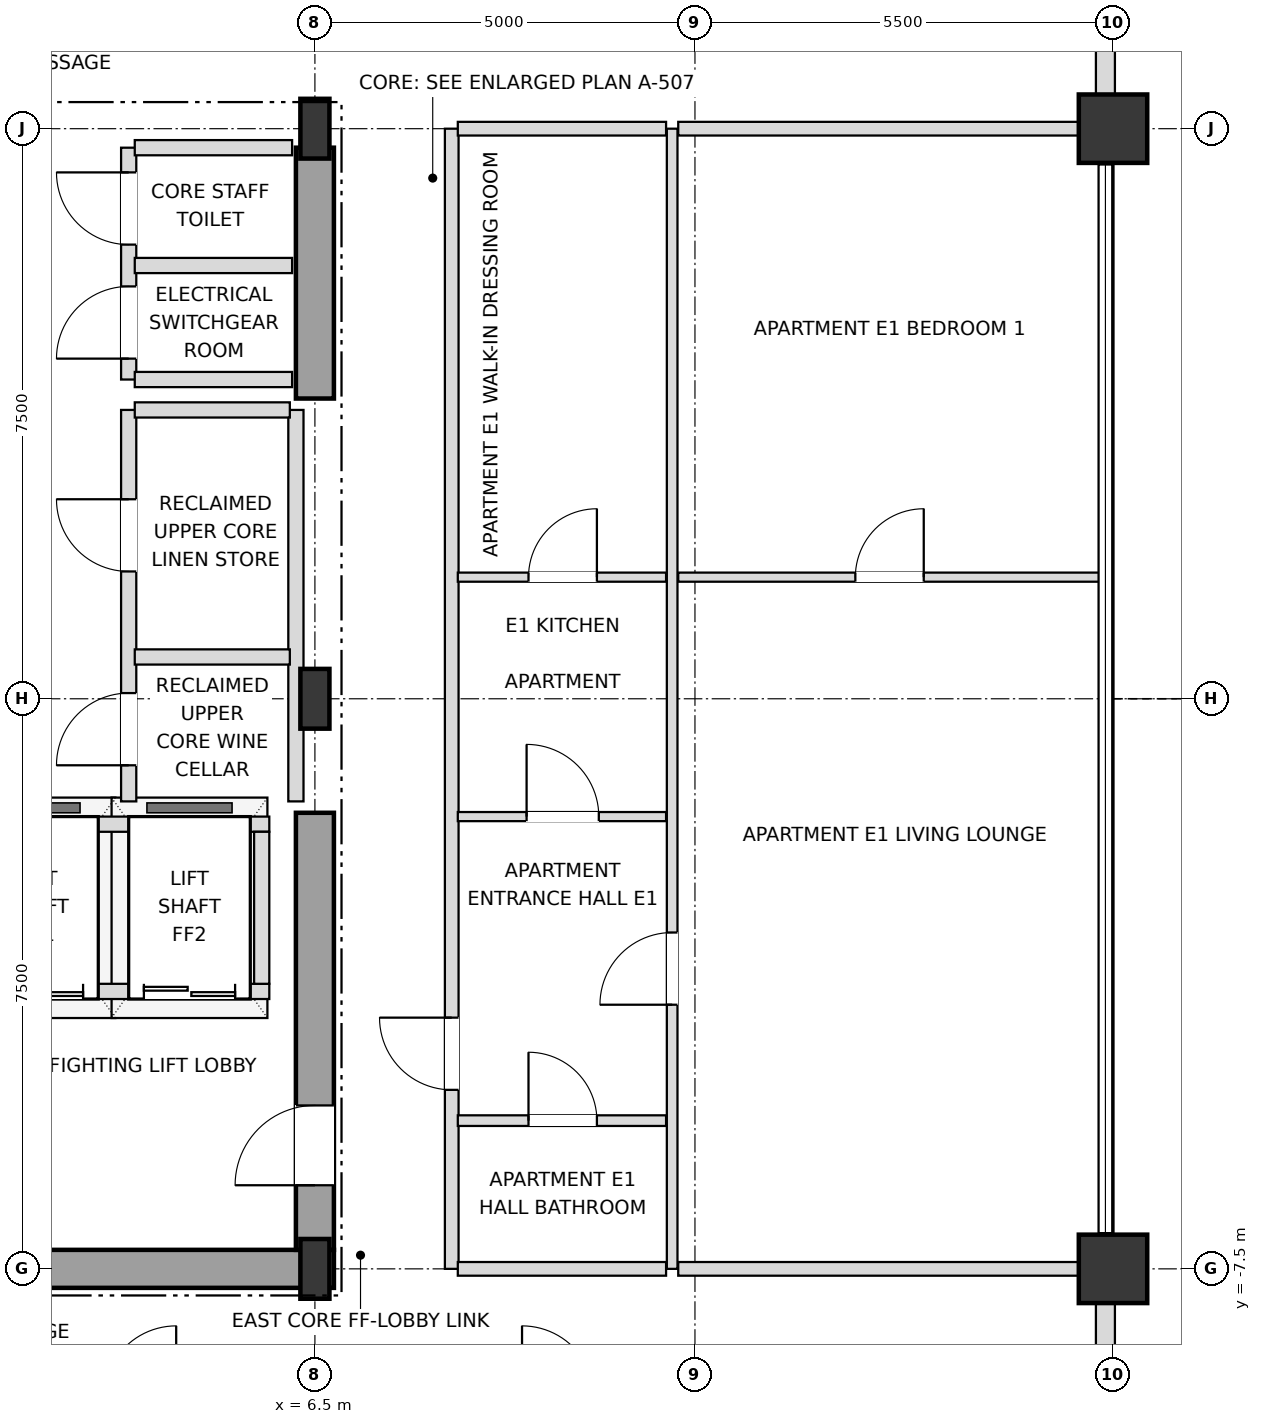
"""IFC4 building model, lengths in metres.
Left out: names, types, materials, properties, quantities, classifications, styles, units other than length and angle.
Written with IfcOpenShell. Run it as: python <this file> out.ifc"""

import sys

from ifc_helpers import new_model, si_unit, direction, frame, frame_2d, origin, origin_2d, place, context, subcontext, project, spatial, rectangle, i_section, extrude, element, fill, save


model = new_model("IFC4")
c1 = context("Model", 3, precision=1e-05, world=origin(), true_north=direction((0.0, 1.0)))
c2 = subcontext(c1, "Body", "Model", "MODEL_VIEW")
j1 = project(units=[si_unit("LENGTHUNIT", "METRE"), si_unit("PLANEANGLEUNIT", "RADIAN")], contexts=[c1])
p1 = place(None, origin())
s1 = spatial("IfcSite", under=j1, at=p1, CompositionType="ELEMENT")
p2 = place(p1, origin())
s2 = spatial("IfcBuilding", under=s1, at=p2, CompositionType="ELEMENT")
p3 = place(p2, frame((0.0, 0.0, 283.5)))
s3 = spatial("IfcBuildingStorey", under=s2, at=p3, CompositionType="ELEMENT", Elevation=283.5)
for number, where, z_axis, x_axis in (
    (1, (6.5, -7.5, 0.0), (0.0, 0.0, 1.0), (1.0, 0.0, 0.0)),
    (2, (6.5, 0.0, 0.0), (0.0, 0.0, 1.0), (1.0, 0.0, 0.0)),
    (3, (6.5, 7.5, 0.0), (0.0, 0.0, 1.0), (1.0, 0.0, 0.0)),
):
    element("IfcColumn", number, at=place(p3, frame(where, z_axis=z_axis, x_axis=x_axis)), inside=s3, PredefinedType="COLUMN", context=c2, shape_type="SweptSolid", body=[
        extrude(i_section(OverallWidth=0.382, OverallDepth=0.786, WebThickness=0.02, FlangeThickness=0.033, at=origin_2d()), origin(), (0.0, 0.0, 1.0), 3.6),
    ])
for number, where, z_axis, x_axis in (
    (4, (17.0, -7.5, 0.0), (0.0, 0.0, 1.0), (1.0, 0.0, 0.0)),
    (5, (17.0, 7.5, 0.0), (0.0, 0.0, 1.0), (1.0, 0.0, 0.0)),
):
    element("IfcColumn", number, at=place(p3, frame(where, z_axis=z_axis, x_axis=x_axis)), inside=s3, PredefinedType="USERDEFINED", context=c2, shape_type="SweptSolid", body=[
        extrude(rectangle(XDim=0.9, YDim=0.9, at=origin_2d()), origin(), (0.0, 0.0, 1.0), 3.6),
    ])
p4 = place(p3, frame((16.9, -12.555, 0.0), z_axis=(0.0, 0.0, 1.0), x_axis=(0.0, 1.0, 0.0)))
e6 = element("IfcWall", 6, at=p4, inside=s3, PredefinedType="SOLIDWALL", context=c2, shape_type="SweptSolid", body=[
    extrude(rectangle(XDim=4.61, YDim=0.25, at=frame_2d((2.305, 0.0))), origin(), (0.0, 0.0, 1.0), 2.748),
])
p5 = place(p4, frame((1.405, 0.0, 0.72)))
e7 = element("IfcOpeningElement", 7, at=p5, cuts=e6, PredefinedType="OPENING", context=c2, shape_type="SweptSolid", body=[
    extrude(rectangle(XDim=1.8, YDim=1.68, at=frame_2d((0.9, 0.84))), frame((0.0, 0.135, 0.0), z_axis=(0.0, -1.0, 0.0), x_axis=(1.0, 0.0, 0.0)), (0.0, 0.0, 1.0), 0.27),
])
p6 = place(p3, frame((16.9, 7.945, 0.0), z_axis=(0.0, 0.0, 1.0), x_axis=(0.0, 1.0, 0.0)))
e8 = element("IfcWall", 8, at=p6, inside=s3, PredefinedType="SOLIDWALL", context=c2, shape_type="SweptSolid", body=[
    extrude(rectangle(XDim=4.61, YDim=0.25, at=frame_2d((2.305, 0.0))), origin(), (0.0, 0.0, 1.0), 2.748),
])
p7 = place(p6, frame((1.405, 0.0, 0.72)))
e9 = element("IfcOpeningElement", 9, at=p7, cuts=e8, PredefinedType="OPENING", context=c2, shape_type="SweptSolid", body=[
    extrude(rectangle(XDim=1.8, YDim=1.68, at=frame_2d((0.9, 0.84))), frame((0.0, 0.135, 0.0), z_axis=(0.0, -1.0, 0.0), x_axis=(1.0, 0.0, 0.0)), (0.0, 0.0, 1.0), 0.27),
])
p8 = place(p3, frame((0.0, -7.5, 0.0), z_axis=(0.0, 0.0, 1.0), x_axis=(1.0, 0.0, 0.0)))
e10 = element("IfcWall", 10, at=p8, inside=s3, PredefinedType="SHEAR", context=c2, shape_type="SweptSolid", body=[
    extrude(rectangle(XDim=6.75, YDim=0.5, at=frame_2d((3.375, 0.0))), origin(), (0.0, 0.0, 1.0), 3.38),
])
p9 = place(p3, frame((6.5, -7.25, 0.0), z_axis=(0.0, 0.0, 1.0), x_axis=(0.0, 1.0, 0.0)))
e11 = element("IfcWall", 11, at=p9, inside=s3, PredefinedType="SHEAR", context=c2, shape_type="SweptSolid", body=[
    extrude(rectangle(XDim=5.75, YDim=0.5, at=frame_2d((2.875, 0.0))), origin(), (0.0, 0.0, 1.0), 3.38),
])
p10 = place(p9, frame((0.85, 0.0, 0.0)))
e12 = element("IfcOpeningElement", 12, at=p10, cuts=e11, PredefinedType="OPENING", context=c2, shape_type="SweptSolid", body=[
    extrude(rectangle(XDim=1.05, YDim=2.15, at=frame_2d((0.525, 1.075))), frame((0.0, 0.26, 0.0), z_axis=(0.0, -1.0, 0.0), x_axis=(1.0, 0.0, 0.0)), (0.0, 0.0, 1.0), 0.52),
])
p11 = place(p3, frame((6.5, 3.95, 0.0), z_axis=(0.0, 0.0, 1.0), x_axis=(0.0, 1.0, 0.0)))
e13 = element("IfcWall", 13, at=p11, inside=s3, PredefinedType="SHEAR", context=c2, shape_type="SweptSolid", body=[
    extrude(rectangle(XDim=3.3, YDim=0.5, at=frame_2d((1.65, 0.0))), origin(), (0.0, 0.0, 1.0), 3.38),
])
p12 = place(p3, frame((1.8, -3.85, 0.0), z_axis=(0.0, 0.0, 1.0), x_axis=(1.0, 0.0, 0.0)))
e14 = element("IfcWall", 14, at=p12, inside=s3, PredefinedType="SOLIDWALL", context=c2, shape_type="SweptSolid", body=[
    extrude(rectangle(XDim=4.1, YDim=0.2, at=frame_2d((2.05, 0.0))), origin(), (0.0, 0.0, 1.0), 3.38),
])
p13 = place(p12, frame((0.45, 0.0, 0.0)))
e15 = element("IfcOpeningElement", 15, at=p13, cuts=e14, PredefinedType="OPENING", context=c2, shape_type="SweptSolid", body=[
    extrude(rectangle(XDim=1.2, YDim=2.2, at=frame_2d((0.6, 1.1))), frame((0.0, 0.11, 0.0), z_axis=(0.0, -1.0, 0.0), x_axis=(1.0, 0.0, 0.0)), (0.0, 0.0, 1.0), 0.22),
])
p14 = place(p12, frame((2.45, 0.0, 0.0)))
e16 = element("IfcOpeningElement", 16, at=p14, cuts=e14, PredefinedType="OPENING", context=c2, shape_type="SweptSolid", body=[
    extrude(rectangle(XDim=1.2, YDim=2.2, at=frame_2d((0.6, 1.1))), frame((0.0, 0.11, 0.0), z_axis=(0.0, -1.0, 0.0), x_axis=(1.0, 0.0, 0.0)), (0.0, 0.0, 1.0), 0.22),
])
p15 = place(p3, frame((1.8, -1.65, 0.0), z_axis=(0.0, 0.0, 1.0), x_axis=(1.0, 0.0, 0.0)))
e17 = element("IfcWall", 17, at=p15, inside=s3, PredefinedType="SOLIDWALL", context=c2, shape_type="SweptSolid", body=[
    extrude(rectangle(XDim=4.1, YDim=0.2, at=frame_2d((2.05, 0.0))), origin(), (0.0, 0.0, 1.0), 3.38),
])
p16 = place(p3, frame((5.8, -3.75, 0.0), z_axis=(0.0, 0.0, 1.0), x_axis=(0.0, 1.0, 0.0)))
e18 = element("IfcWall", 18, at=p16, inside=s3, PredefinedType="SOLIDWALL", context=c2, shape_type="SweptSolid", body=[
    extrude(rectangle(XDim=2.0, YDim=0.2, at=frame_2d((1.0, 0.0))), origin(), (0.0, 0.0, 1.0), 3.38),
])
p17 = place(p3, frame((4.05, -1.35, 0.0), z_axis=(0.0, 0.0, 1.0), x_axis=(0.0, 1.0, 0.0)))
e19 = element("IfcWall", 19, at=p17, inside=s3, PredefinedType="SOLIDWALL", context=c2, shape_type="SweptSolid", body=[
    extrude(rectangle(XDim=5.15, YDim=0.2, at=frame_2d((2.575, 0.0))), origin(), (0.0, 0.0, 1.0), 3.38),
])
p18 = place(p17, frame((0.475, 0.0, 0.0)))
e20 = element("IfcOpeningElement", 20, at=p18, cuts=e19, PredefinedType="OPENING", context=c2, shape_type="SweptSolid", body=[
    extrude(rectangle(XDim=0.95, YDim=2.15, at=frame_2d((0.475, 1.075))), frame((0.0, 0.11, 0.0), z_axis=(0.0, -1.0, 0.0), x_axis=(1.0, 0.0, 0.0)), (0.0, 0.0, 1.0), 0.22),
])
p19 = place(p17, frame((3.025, 0.0, 0.0)))
e21 = element("IfcOpeningElement", 21, at=p19, cuts=e19, PredefinedType="OPENING", context=c2, shape_type="SweptSolid", body=[
    extrude(rectangle(XDim=0.95, YDim=2.15, at=frame_2d((0.475, 1.075))), frame((0.0, 0.11, 0.0), z_axis=(0.0, -1.0, 0.0), x_axis=(1.0, 0.0, 0.0)), (0.0, 0.0, 1.0), 0.22),
])
p20 = place(p3, frame((4.05, 4.2, 0.0), z_axis=(0.0, 0.0, 1.0), x_axis=(0.0, 1.0, 0.0)))
e22 = element("IfcWall", 22, at=p20, inside=s3, PredefinedType="SOLIDWALL", context=c2, shape_type="SweptSolid", body=[
    extrude(rectangle(XDim=3.05, YDim=0.2, at=frame_2d((1.525, 0.0))), origin(), (0.0, 0.0, 1.0), 3.38),
])
p21 = place(p20, frame((0.275, 0.0, 0.0)))
e23 = element("IfcOpeningElement", 23, at=p21, cuts=e22, PredefinedType="OPENING", context=c2, shape_type="SweptSolid", body=[
    extrude(rectangle(XDim=0.95, YDim=2.15, at=frame_2d((0.475, 1.075))), frame((0.0, 0.11, 0.0), z_axis=(0.0, -1.0, 0.0), x_axis=(1.0, 0.0, 0.0)), (0.0, 0.0, 1.0), 0.22),
])
p22 = place(p20, frame((1.775, 0.0, 0.0)))
e24 = element("IfcOpeningElement", 24, at=p22, cuts=e22, PredefinedType="OPENING", context=c2, shape_type="SweptSolid", body=[
    extrude(rectangle(XDim=0.95, YDim=2.15, at=frame_2d((0.475, 1.075))), frame((0.0, 0.11, 0.0), z_axis=(0.0, -1.0, 0.0), x_axis=(1.0, 0.0, 0.0)), (0.0, 0.0, 1.0), 0.22),
])
p23 = place(p3, frame((6.25, -1.35, 0.0), z_axis=(0.0, 0.0, 1.0), x_axis=(0.0, 1.0, 0.0)))
e25 = element("IfcWall", 25, at=p23, inside=s3, PredefinedType="SOLIDWALL", context=c2, shape_type="SweptSolid", body=[
    extrude(rectangle(XDim=5.15, YDim=0.2, at=frame_2d((2.575, 0.0))), origin(), (0.0, 0.0, 1.0), 3.38),
])
p24 = place(p3, frame((8.3, -7.5, 0.0), z_axis=(0.0, 0.0, 1.0), x_axis=(0.0, 1.0, 0.0)))
e26 = element("IfcWall", 26, at=p24, inside=s3, PredefinedType="PARTITIONING", context=c2, shape_type="SweptSolid", body=[
    extrude(rectangle(XDim=15.0, YDim=0.18, at=frame_2d((7.5, 0.0))), origin(), (0.0, 0.0, 1.0), 3.38),
])
p25 = place(p24, frame((2.355, 0.0, 0.0)))
e27 = element("IfcOpeningElement", 27, at=p25, cuts=e26, PredefinedType="OPENING", context=c2, shape_type="SweptSolid", body=[
    extrude(rectangle(XDim=0.95, YDim=2.15, at=frame_2d((0.475, 1.075))), frame((0.0, 0.1, 0.0), z_axis=(0.0, -1.0, 0.0), x_axis=(1.0, 0.0, 0.0)), (0.0, 0.0, 1.0), 0.2),
])
p26 = place(p3, frame((11.2, -7.5, 0.0), z_axis=(0.0, 0.0, 1.0), x_axis=(0.0, 1.0, 0.0)))
e28 = element("IfcWall", 28, at=p26, inside=s3, PredefinedType="PARTITIONING", context=c2, shape_type="SweptSolid", body=[
    extrude(rectangle(XDim=15.0, YDim=0.14, at=frame_2d((7.5, 0.0))), origin(), (0.0, 0.0, 1.0), 3.38),
])
p27 = place(p26, frame((3.475, 0.0, 0.0)))
e29 = element("IfcOpeningElement", 29, at=p27, cuts=e28, PredefinedType="OPENING", context=c2, shape_type="SweptSolid", body=[
    extrude(rectangle(XDim=0.95, YDim=2.1, at=frame_2d((0.475, 1.05))), frame((0.0, 0.08, 0.0), z_axis=(0.0, -1.0, 0.0), x_axis=(1.0, 0.0, 0.0)), (0.0, 0.0, 1.0), 0.16),
])
p28 = place(p3, frame((8.38, -7.5, 0.0), z_axis=(0.0, 0.0, 1.0), x_axis=(1.0, 0.0, 0.0)))
e30 = element("IfcWall", 30, at=p28, inside=s3, PredefinedType="PARTITIONING", context=c2, shape_type="SweptSolid", body=[
    extrude(rectangle(XDim=2.74, YDim=0.18, at=frame_2d((1.37, 0.0))), origin(), (0.0, 0.0, 1.0), 2.826),
])
p29 = place(p3, frame((11.28, -7.5, 0.0), z_axis=(0.0, 0.0, 1.0), x_axis=(1.0, 0.0, 0.0)))
e31 = element("IfcWall", 31, at=p29, inside=s3, PredefinedType="PARTITIONING", context=c2, shape_type="SweptSolid", body=[
    extrude(rectangle(XDim=5.62, YDim=0.18, at=frame_2d((2.81, 0.0))), origin(), (0.0, 0.0, 1.0), 2.826),
])
p30 = place(p3, frame((8.38, -5.55, 0.0), z_axis=(0.0, 0.0, 1.0), x_axis=(1.0, 0.0, 0.0)))
e32 = element("IfcWall", 32, at=p30, inside=s3, PredefinedType="PARTITIONING", context=c2, shape_type="SweptSolid", body=[
    extrude(rectangle(XDim=2.74, YDim=0.14, at=frame_2d((1.37, 0.0))), origin(), (0.0, 0.0, 1.0), 3.38),
])
p31 = place(p30, frame((0.93, 0.0, 0.0)))
e33 = element("IfcOpeningElement", 33, at=p31, cuts=e32, PredefinedType="OPENING", context=c2, shape_type="SweptSolid", body=[
    extrude(rectangle(XDim=0.9, YDim=2.1, at=frame_2d((0.45, 1.05))), frame((0.0, 0.08, 0.0), z_axis=(0.0, -1.0, 0.0), x_axis=(1.0, 0.0, 0.0)), (0.0, 0.0, 1.0), 0.16),
])
p32 = place(p3, frame((8.38, -1.55, 0.0), z_axis=(0.0, 0.0, 1.0), x_axis=(1.0, 0.0, 0.0)))
e34 = element("IfcWall", 34, at=p32, inside=s3, PredefinedType="PARTITIONING", context=c2, shape_type="SweptSolid", body=[
    extrude(rectangle(XDim=2.74, YDim=0.12, at=frame_2d((1.37, 0.0))), origin(), (0.0, 0.0, 1.0), 3.38),
])
p33 = place(p32, frame((0.905, 0.0, 0.0)))
e35 = element("IfcOpeningElement", 35, at=p33, cuts=e34, PredefinedType="OPENING", context=c2, shape_type="SweptSolid", body=[
    extrude(rectangle(XDim=0.95, YDim=2.1, at=frame_2d((0.475, 1.05))), frame((0.0, 0.07, 0.0), z_axis=(0.0, -1.0, 0.0), x_axis=(1.0, 0.0, 0.0)), (0.0, 0.0, 1.0), 0.14),
])
p34 = place(p3, frame((4.13, 0.55, 0.0), z_axis=(0.0, 0.0, 1.0), x_axis=(1.0, 0.0, 0.0)))
e36 = element("IfcWall", 36, at=p34, inside=s3, PredefinedType="SOLIDWALL", context=c2, shape_type="SweptSolid", body=[
    extrude(rectangle(XDim=2.04, YDim=0.2, at=frame_2d((1.02, 0.0))), origin(), (0.0, 0.0, 1.0), 3.38),
])
p35 = place(p3, frame((8.38, 1.6, 0.0), z_axis=(0.0, 0.0, 1.0), x_axis=(1.0, 0.0, 0.0)))
e37 = element("IfcWall", 37, at=p35, inside=s3, PredefinedType="PARTITIONING", context=c2, shape_type="SweptSolid", body=[
    extrude(rectangle(XDim=2.74, YDim=0.12, at=frame_2d((1.37, 0.0))), origin(), (0.0, 0.0, 1.0), 3.38),
])
p36 = place(p35, frame((0.93, 0.0, 0.0)))
e38 = element("IfcOpeningElement", 38, at=p36, cuts=e37, PredefinedType="OPENING", context=c2, shape_type="SweptSolid", body=[
    extrude(rectangle(XDim=0.9, YDim=2.1, at=frame_2d((0.45, 1.05))), frame((0.0, 0.07, 0.0), z_axis=(0.0, -1.0, 0.0), x_axis=(1.0, 0.0, 0.0)), (0.0, 0.0, 1.0), 0.14),
])
p37 = place(p3, frame((11.28, 1.6, 0.0), z_axis=(0.0, 0.0, 1.0), x_axis=(1.0, 0.0, 0.0)))
e39 = element("IfcWall", 39, at=p37, inside=s3, PredefinedType="PARTITIONING", context=c2, shape_type="SweptSolid", body=[
    extrude(rectangle(XDim=5.54, YDim=0.12, at=frame_2d((2.77, 0.0))), origin(), (0.0, 0.0, 1.0), 3.018),
])
p38 = place(p37, frame((2.33, 0.0, 0.0)))
e40 = element("IfcOpeningElement", 40, at=p38, cuts=e39, PredefinedType="OPENING", context=c2, shape_type="SweptSolid", body=[
    extrude(rectangle(XDim=0.9, YDim=2.1, at=frame_2d((0.45, 1.05))), frame((0.0, 0.07, 0.0), z_axis=(0.0, -1.0, 0.0), x_axis=(1.0, 0.0, 0.0)), (0.0, 0.0, 1.0), 0.14),
])
p39 = place(p3, frame((4.13, 3.8, 0.0), z_axis=(0.0, 0.0, 1.0), x_axis=(1.0, 0.0, 0.0)))
e41 = element("IfcWall", 41, at=p39, inside=s3, PredefinedType="SOLIDWALL", context=c2, shape_type="SweptSolid", body=[
    extrude(rectangle(XDim=2.04, YDim=0.2, at=frame_2d((1.02, 0.0))), origin(), (0.0, 0.0, 1.0), 3.38),
])
for number, where, z_axis, x_axis in (
    (42, (4.13, 4.2, 0.0), (0.0, 0.0, 1.0), (1.0, 0.0, 0.0)),
    (43, (4.13, 5.7, 0.0), (0.0, 0.0, 1.0), (1.0, 0.0, 0.0)),
    (44, (4.13, 7.25, 0.0), (0.0, 0.0, 1.0), (1.0, 0.0, 0.0)),
):
    element("IfcWall", number, at=place(p3, frame(where, z_axis=z_axis, x_axis=x_axis)), inside=s3, PredefinedType="SOLIDWALL", context=c2, shape_type="SweptSolid", body=[
        extrude(rectangle(XDim=2.07, YDim=0.2, at=frame_2d((1.035, 0.0))), origin(), (0.0, 0.0, 1.0), 3.38),
    ])
p40 = place(p3, frame((8.38, 7.5, 0.0), z_axis=(0.0, 0.0, 1.0), x_axis=(1.0, 0.0, 0.0)))
e45 = element("IfcWall", 45, at=p40, inside=s3, PredefinedType="PARTITIONING", context=c2, shape_type="SweptSolid", body=[
    extrude(rectangle(XDim=2.74, YDim=0.18, at=frame_2d((1.37, 0.0))), origin(), (0.0, 0.0, 1.0), 2.826),
])
p41 = place(p3, frame((11.28, 7.5, 0.0), z_axis=(0.0, 0.0, 1.0), x_axis=(1.0, 0.0, 0.0)))
e46 = element("IfcWall", 46, at=p41, inside=s3, PredefinedType="PARTITIONING", context=c2, shape_type="SweptSolid", body=[
    extrude(rectangle(XDim=5.62, YDim=0.18, at=frame_2d((2.81, 0.0))), origin(), (0.0, 0.0, 1.0), 2.826),
])
p42 = place(p10, origin())
e47 = element("IfcDoor", 47, at=p42, inside=s3, OperationType="SINGLE_SWING_LEFT", PredefinedType="DOOR", context=c2, shape_type="SweptSolid", body=[
    extrude(rectangle(XDim=1.05, YDim=2.15, at=frame_2d((0.525, 1.075))), frame((0.0, 0.025, 0.0), z_axis=(0.0, -1.0, 0.0), x_axis=(1.0, 0.0, 0.0)), (0.0, 0.0, 1.0), 0.05),
])
fill(e12, e47)
p43 = place(p13, origin())
e48 = element("IfcDoor", 48, at=p43, inside=s3, OperationType="DOUBLE_DOOR_SLIDING", PredefinedType="DOOR", context=c2, shape_type="SweptSolid", body=[
    extrude(rectangle(XDim=1.2, YDim=2.2, at=frame_2d((0.6, 1.1))), frame((0.0, 0.025, 0.0), z_axis=(0.0, -1.0, 0.0), x_axis=(1.0, 0.0, 0.0)), (0.0, 0.0, 1.0), 0.05),
])
fill(e15, e48)
p44 = place(p14, origin())
e49 = element("IfcDoor", 49, at=p44, inside=s3, OperationType="DOUBLE_DOOR_SLIDING", PredefinedType="DOOR", context=c2, shape_type="SweptSolid", body=[
    extrude(rectangle(XDim=1.2, YDim=2.2, at=frame_2d((0.6, 1.1))), frame((0.0, 0.025, 0.0), z_axis=(0.0, -1.0, 0.0), x_axis=(1.0, 0.0, 0.0)), (0.0, 0.0, 1.0), 0.05),
])
fill(e16, e49)
p45 = place(p18, origin())
e50 = element("IfcDoor", 50, at=p45, inside=s3, OperationType="SINGLE_SWING_LEFT", PredefinedType="DOOR", context=c2, shape_type="SweptSolid", body=[
    extrude(rectangle(XDim=0.95, YDim=2.15, at=frame_2d((0.475, 1.075))), frame((0.0, 0.025, 0.0), z_axis=(0.0, -1.0, 0.0), x_axis=(1.0, 0.0, 0.0)), (0.0, 0.0, 1.0), 0.05),
])
fill(e20, e50)
p46 = place(p19, origin())
e51 = element("IfcDoor", 51, at=p46, inside=s3, OperationType="SINGLE_SWING_RIGHT", PredefinedType="DOOR", context=c2, shape_type="SweptSolid", body=[
    extrude(rectangle(XDim=0.95, YDim=2.15, at=frame_2d((0.475, 1.075))), frame((0.0, 0.025, 0.0), z_axis=(0.0, -1.0, 0.0), x_axis=(1.0, 0.0, 0.0)), (0.0, 0.0, 1.0), 0.05),
])
fill(e21, e51)
p47 = place(p21, origin())
e52 = element("IfcDoor", 52, at=p47, inside=s3, OperationType="SINGLE_SWING_LEFT", PredefinedType="DOOR", context=c2, shape_type="SweptSolid", body=[
    extrude(rectangle(XDim=0.95, YDim=2.15, at=frame_2d((0.475, 1.075))), frame((0.0, 0.025, 0.0), z_axis=(0.0, -1.0, 0.0), x_axis=(1.0, 0.0, 0.0)), (0.0, 0.0, 1.0), 0.05),
])
fill(e23, e52)
p48 = place(p22, origin())
e53 = element("IfcDoor", 53, at=p48, inside=s3, OperationType="SINGLE_SWING_RIGHT", PredefinedType="DOOR", context=c2, shape_type="SweptSolid", body=[
    extrude(rectangle(XDim=0.95, YDim=2.15, at=frame_2d((0.475, 1.075))), frame((0.0, 0.025, 0.0), z_axis=(0.0, -1.0, 0.0), x_axis=(1.0, 0.0, 0.0)), (0.0, 0.0, 1.0), 0.05),
])
fill(e24, e53)
p49 = place(p31, origin())
e54 = element("IfcDoor", 54, at=p49, inside=s3, OperationType="SINGLE_SWING_LEFT", PredefinedType="DOOR", context=c2, shape_type="SweptSolid", body=[
    extrude(rectangle(XDim=0.9, YDim=2.1, at=frame_2d((0.45, 1.05))), frame((0.0, 0.025, 0.0), z_axis=(0.0, -1.0, 0.0), x_axis=(1.0, 0.0, 0.0)), (0.0, 0.0, 1.0), 0.05),
])
fill(e33, e54)
p50 = place(p25, origin())
e55 = element("IfcDoor", 55, at=p50, inside=s3, OperationType="SINGLE_SWING_RIGHT", PredefinedType="DOOR", context=c2, shape_type="SweptSolid", body=[
    extrude(rectangle(XDim=0.95, YDim=2.15, at=frame_2d((0.475, 1.075))), frame((0.0, 0.025, 0.0), z_axis=(0.0, -1.0, 0.0), x_axis=(1.0, 0.0, 0.0)), (0.0, 0.0, 1.0), 0.05),
])
fill(e27, e55)
p51 = place(p33, origin())
e56 = element("IfcDoor", 56, at=p51, inside=s3, OperationType="SINGLE_SWING_LEFT", PredefinedType="DOOR", context=c2, shape_type="SweptSolid", body=[
    extrude(rectangle(XDim=0.95, YDim=2.1, at=frame_2d((0.475, 1.05))), frame((0.0, 0.025, 0.0), z_axis=(0.0, -1.0, 0.0), x_axis=(1.0, 0.0, 0.0)), (0.0, 0.0, 1.0), 0.05),
])
fill(e35, e56)
p52 = place(p36, origin())
e57 = element("IfcDoor", 57, at=p52, inside=s3, OperationType="SINGLE_SWING_RIGHT", PredefinedType="DOOR", context=c2, shape_type="SweptSolid", body=[
    extrude(rectangle(XDim=0.9, YDim=2.1, at=frame_2d((0.45, 1.05))), frame((0.0, 0.025, 0.0), z_axis=(0.0, -1.0, 0.0), x_axis=(1.0, 0.0, 0.0)), (0.0, 0.0, 1.0), 0.05),
])
fill(e38, e57)
p53 = place(p27, origin())
e58 = element("IfcDoor", 58, at=p53, inside=s3, OperationType="SINGLE_SWING_LEFT", PredefinedType="DOOR", context=c2, shape_type="SweptSolid", body=[
    extrude(rectangle(XDim=0.95, YDim=2.1, at=frame_2d((0.475, 1.05))), frame((0.0, 0.025, 0.0), z_axis=(0.0, -1.0, 0.0), x_axis=(1.0, 0.0, 0.0)), (0.0, 0.0, 1.0), 0.05),
])
fill(e29, e58)
p54 = place(p38, origin())
e59 = element("IfcDoor", 59, at=p54, inside=s3, OperationType="SINGLE_SWING_RIGHT", PredefinedType="DOOR", context=c2, shape_type="SweptSolid", body=[
    extrude(rectangle(XDim=0.9, YDim=2.1, at=frame_2d((0.45, 1.05))), frame((0.0, 0.025, 0.0), z_axis=(0.0, -1.0, 0.0), x_axis=(1.0, 0.0, 0.0)), (0.0, 0.0, 1.0), 0.05),
])
fill(e40, e59)
save(model, sys.argv[1])
